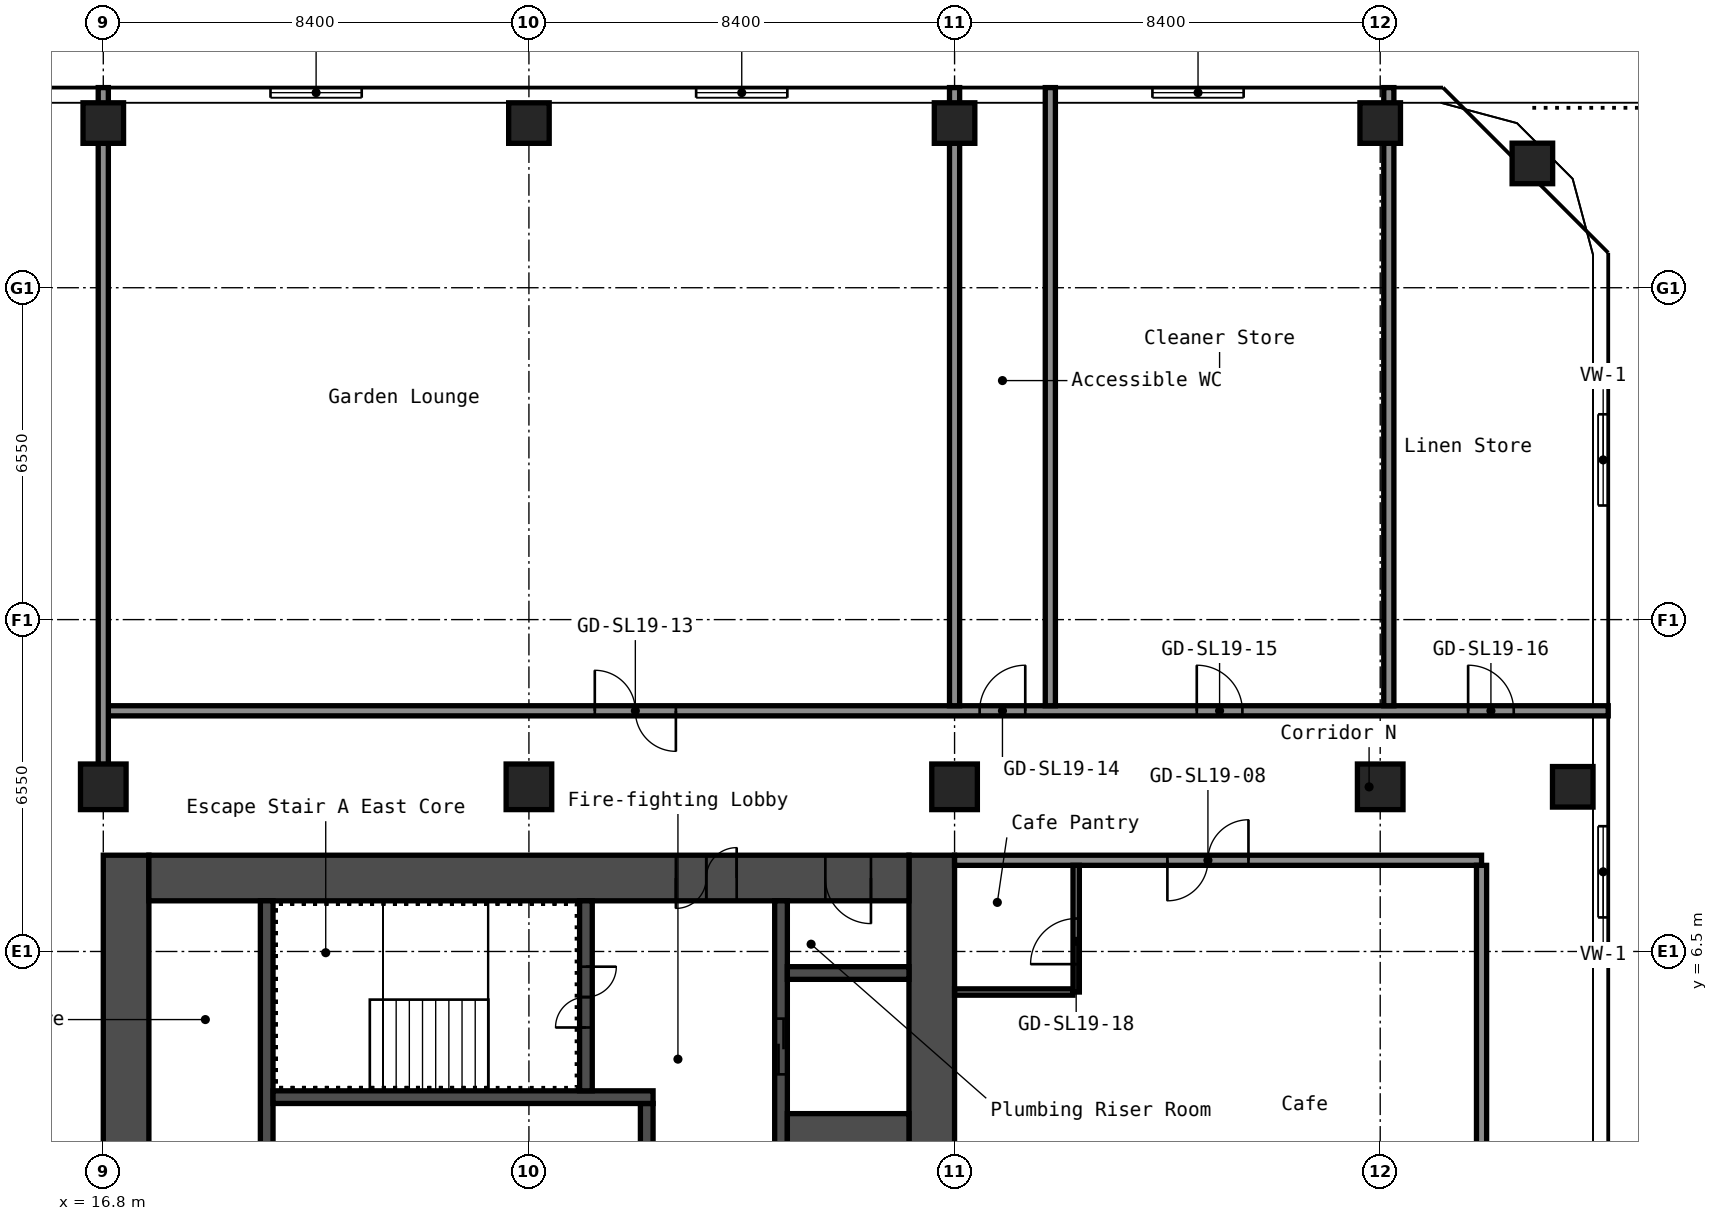
"""IFC4 building model, lengths in metres.
Left out: names, types, materials, properties, quantities, classifications, styles, units other than length and angle.
Written with IfcOpenShell. Run it as: python <this file> out.ifc"""

import sys

from ifc_helpers import new_model, si_unit, direction, frame, frame_2d, origin, origin_2d, place, context, subcontext, project, spatial, rectangle, hollow_rectangle, extrude, element, fill, save


model = new_model("IFC4")
c1 = context("Model", 3, precision=1e-05, world=origin(), true_north=direction((0.0, 1.0)))
c2 = subcontext(c1, "Body", "Model", "MODEL_VIEW")
j1 = project(units=[si_unit("LENGTHUNIT", "METRE"), si_unit("PLANEANGLEUNIT", "RADIAN")], contexts=[c1])
p1 = place(None, origin())
s1 = spatial("IfcSite", under=j1, at=p1, CompositionType="ELEMENT")
p2 = place(p1, origin())
s2 = spatial("IfcBuilding", under=s1, at=p2, CompositionType="ELEMENT")
p3 = place(p2, frame((0.0, 0.0, 69.0)))
s3 = spatial("IfcBuildingStorey", under=s2, at=p3, CompositionType="ELEMENT", Elevation=69.0)
p4 = place(p3, frame((16.8, 9.75, 0.0), z_axis=(0.0, 0.0, 1.0), x_axis=(1.0, 0.0, 0.0)))
e1 = element("IfcColumn", 1, at=p4, inside=s3, PredefinedType="COLUMN", context=c2, shape_type="SweptSolid", body=[
    extrude(hollow_rectangle(XDim=0.9, YDim=0.9, WallThickness=0.036, at=origin_2d()), origin(), (0.0, 0.0, 1.0), 6.0),
])
p5 = place(p3, frame((16.8, 22.85, 0.0), z_axis=(0.0, 0.0, 1.0), x_axis=(1.0, 0.0, 0.0)))
e2 = element("IfcColumn", 2, at=p5, inside=s3, PredefinedType="COLUMN", context=c2, shape_type="SweptSolid", body=[
    extrude(hollow_rectangle(XDim=0.8, YDim=0.8, WallThickness=0.032, at=origin_2d()), origin(), (0.0, 0.0, 1.0), 6.0),
])
p6 = place(p3, frame((25.2, 9.75, 0.0), z_axis=(0.0, 0.0, 1.0), x_axis=(1.0, 0.0, 0.0)))
e3 = element("IfcColumn", 3, at=p6, inside=s3, PredefinedType="COLUMN", context=c2, shape_type="SweptSolid", body=[
    extrude(hollow_rectangle(XDim=0.9, YDim=0.9, WallThickness=0.036, at=origin_2d()), origin(), (0.0, 0.0, 1.0), 6.0),
])
p7 = place(p3, frame((25.2, 22.85, 0.0), z_axis=(0.0, 0.0, 1.0), x_axis=(1.0, 0.0, 0.0)))
e4 = element("IfcColumn", 4, at=p7, inside=s3, PredefinedType="COLUMN", context=c2, shape_type="SweptSolid", body=[
    extrude(hollow_rectangle(XDim=0.8, YDim=0.8, WallThickness=0.032, at=origin_2d()), origin(), (0.0, 0.0, 1.0), 6.0),
])
p8 = place(p3, frame((33.6, 9.75, 0.0), z_axis=(0.0, 0.0, 1.0), x_axis=(1.0, 0.0, 0.0)))
e5 = element("IfcColumn", 5, at=p8, inside=s3, PredefinedType="COLUMN", context=c2, shape_type="SweptSolid", body=[
    extrude(hollow_rectangle(XDim=0.9, YDim=0.9, WallThickness=0.036, at=origin_2d()), origin(), (0.0, 0.0, 1.0), 6.0),
])
p9 = place(p3, frame((33.6, 22.85, 0.0), z_axis=(0.0, 0.0, 1.0), x_axis=(1.0, 0.0, 0.0)))
e6 = element("IfcColumn", 6, at=p9, inside=s3, PredefinedType="COLUMN", context=c2, shape_type="SweptSolid", body=[
    extrude(hollow_rectangle(XDim=0.8, YDim=0.8, WallThickness=0.032, at=origin_2d()), origin(), (0.0, 0.0, 1.0), 6.0),
])
p10 = place(p3, frame((42.0, 9.75, 0.0), z_axis=(0.0, 0.0, 1.0), x_axis=(1.0, 0.0, 0.0)))
e7 = element("IfcColumn", 7, at=p10, inside=s3, PredefinedType="COLUMN", context=c2, shape_type="SweptSolid", body=[
    extrude(hollow_rectangle(XDim=0.9, YDim=0.9, WallThickness=0.036, at=origin_2d()), origin(), (0.0, 0.0, 1.0), 6.0),
])
for number, where, z_axis, x_axis in (
    (8, (42.0, 22.85, 0.0), (0.0, 0.0, 1.0), (1.0, 0.0, 0.0)),
    (9, (45.8, 9.75, 0.0), (0.0, 0.0, 1.0), (1.0, 0.0, 0.0)),
    (10, (45.003, 22.053, 0.0), (0.0, 0.0, 1.0), (1.0, 0.0, 0.0)),
):
    element("IfcColumn", number, at=place(p3, frame(where, z_axis=z_axis, x_axis=x_axis)), inside=s3, PredefinedType="COLUMN", context=c2, shape_type="SweptSolid", body=[
        extrude(hollow_rectangle(XDim=0.8, YDim=0.8, WallThickness=0.032, at=origin_2d()), origin(), (0.0, 0.0, 1.0), 6.0),
    ])
p11 = place(p3, frame((17.25, -8.4, 0.0), z_axis=(0.0, 0.0, 1.0), x_axis=(0.0, 1.0, 0.0)))
e11 = element("IfcWall", 11, at=p11, inside=s3, PredefinedType="SHEAR", context=c2, shape_type="SweptSolid", body=[
    extrude(rectangle(XDim=16.8, YDim=0.9, at=frame_2d((8.4, 0.0))), origin(), (0.0, 0.0, 1.0), 6.0),
])
p12 = place(p11, frame((7.6, 0.0, 0.0)))
e12 = element("IfcOpeningElement", 12, at=p12, cuts=e11, PredefinedType="OPENING", context=c2, shape_type="SweptSolid", body=[
    extrude(rectangle(XDim=1.2, YDim=2.1, at=frame_2d((0.6, 1.05))), frame((0.0, 0.46, 0.0), z_axis=(0.0, -1.0, 0.0), x_axis=(1.0, 0.0, 0.0)), (0.0, 0.0, 1.0), 0.92),
])
p13 = place(p3, frame((33.15, -8.4, 0.0), z_axis=(0.0, 0.0, 1.0), x_axis=(0.0, 1.0, 0.0)))
e13 = element("IfcWall", 13, at=p13, inside=s3, PredefinedType="SHEAR", context=c2, shape_type="SweptSolid", body=[
    extrude(rectangle(XDim=16.8, YDim=0.9, at=frame_2d((8.4, 0.0))), origin(), (0.0, 0.0, 1.0), 6.0),
])
p14 = place(p3, frame((17.7, 7.95, 0.0), z_axis=(0.0, 0.0, 1.0), x_axis=(1.0, 0.0, 0.0)))
e14 = element("IfcWall", 14, at=p14, inside=s3, PredefinedType="SHEAR", context=c2, shape_type="SweptSolid", body=[
    extrude(rectangle(XDim=15.0, YDim=0.9, at=frame_2d((7.5, 0.0))), origin(), (0.0, 0.0, 1.0), 6.0),
])
p15 = place(p14, frame((10.4, 0.0, 0.0)))
e15 = element("IfcOpeningElement", 15, at=p15, cuts=e14, PredefinedType="OPENING", context=c2, shape_type="SweptSolid", body=[
    extrude(rectangle(XDim=1.2, YDim=2.1, at=frame_2d((0.6, 1.05))), frame((0.0, 0.46, 0.0), z_axis=(0.0, -1.0, 0.0), x_axis=(1.0, 0.0, 0.0)), (0.0, 0.0, 1.0), 0.92),
])
p16 = place(p14, frame((13.35, 0.0, 0.0)))
e16 = element("IfcOpeningElement", 16, at=p16, cuts=e14, PredefinedType="OPENING", context=c2, shape_type="SweptSolid", body=[
    extrude(rectangle(XDim=0.9, YDim=2.1, at=frame_2d((0.45, 1.05))), frame((0.0, 0.46, 0.0), z_axis=(0.0, -1.0, 0.0), x_axis=(1.0, 0.0, 0.0)), (0.0, 0.0, 1.0), 0.92),
])
p17 = place(p3, frame((20.025, 1.2, 0.0), z_axis=(0.0, 0.0, 1.0), x_axis=(0.0, 1.0, 0.0)))
e17 = element("IfcWall", 17, at=p17, inside=s3, PredefinedType="SHEAR", context=c2, shape_type="SweptSolid", body=[
    extrude(rectangle(XDim=6.3, YDim=0.25, at=frame_2d((3.15, 0.0))), origin(), (0.0, 0.0, 1.0), 6.0),
])
p18 = place(p3, frame((27.525, 1.45, 0.0), z_axis=(0.0, 0.0, 1.0), x_axis=(0.0, 1.0, 0.0)))
e18 = element("IfcWall", 18, at=p18, inside=s3, PredefinedType="SHEAR", context=c2, shape_type="SweptSolid", body=[
    extrude(rectangle(XDim=2.05, YDim=0.25, at=frame_2d((1.025, 0.0))), origin(), (0.0, 0.0, 1.0), 6.0),
])
p19 = place(p3, frame((20.15, 3.625, 0.0), z_axis=(0.0, 0.0, 1.0), x_axis=(1.0, 0.0, 0.0)))
e19 = element("IfcWall", 19, at=p19, inside=s3, PredefinedType="SHEAR", context=c2, shape_type="SweptSolid", body=[
    extrude(rectangle(XDim=7.5, YDim=0.25, at=frame_2d((3.75, 0.0))), origin(), (0.0, 0.0, 1.0), 6.0),
])
p20 = place(p3, frame((26.325, 3.75, 0.0), z_axis=(0.0, 0.0, 1.0), x_axis=(0.0, 1.0, 0.0)))
e20 = element("IfcWall", 20, at=p20, inside=s3, PredefinedType="SHEAR", context=c2, shape_type="SweptSolid", body=[
    extrude(rectangle(XDim=3.75, YDim=0.25, at=frame_2d((1.875, 0.0))), origin(), (0.0, 0.0, 1.0), 6.0),
])
p21 = place(p20, frame((1.25, 0.0, 0.0)))
e21 = element("IfcOpeningElement", 21, at=p21, cuts=e20, PredefinedType="OPENING", context=c2, shape_type="SweptSolid", body=[
    extrude(rectangle(XDim=1.2, YDim=2.1, at=frame_2d((0.6, 1.05))), frame((0.0, 0.135, 0.0), z_axis=(0.0, -1.0, 0.0), x_axis=(1.0, 0.0, 0.0)), (0.0, 0.0, 1.0), 0.27),
])
p22 = place(p3, frame((30.175, 1.45, 0.0), z_axis=(0.0, 0.0, 1.0), x_axis=(0.0, 1.0, 0.0)))
e22 = element("IfcWall", 22, at=p22, inside=s3, PredefinedType="SHEAR", context=c2, shape_type="SweptSolid", body=[
    extrude(rectangle(XDim=6.05, YDim=0.25, at=frame_2d((3.025, 0.0))), origin(), (0.0, 0.0, 1.0), 6.0),
])
p23 = place(p22, frame((2.625, 0.0, 0.0)))
e23 = element("IfcOpeningElement", 23, at=p23, cuts=e22, PredefinedType="OPENING", context=c2, shape_type="SweptSolid", body=[
    extrude(rectangle(XDim=1.1, YDim=2.1, at=frame_2d((0.55, 1.05))), frame((0.0, 0.135, 0.0), z_axis=(0.0, -1.0, 0.0), x_axis=(1.0, 0.0, 0.0)), (0.0, 0.0, 1.0), 0.27),
])
p24 = place(p3, frame((30.3, 2.375, 0.0), z_axis=(0.0, 0.0, 1.0), x_axis=(1.0, 0.0, 0.0)))
e24 = element("IfcWall", 24, at=p24, inside=s3, PredefinedType="SHEAR", context=c2, shape_type="SweptSolid", body=[
    extrude(rectangle(XDim=2.4, YDim=1.85, at=frame_2d((1.2, 0.0))), origin(), (0.0, 0.0, 1.0), 6.0),
])
p25 = place(p3, frame((30.3, 6.075, 0.0), z_axis=(0.0, 0.0, 1.0), x_axis=(1.0, 0.0, 0.0)))
e25 = element("IfcWall", 25, at=p25, inside=s3, PredefinedType="SHEAR", context=c2, shape_type="SweptSolid", body=[
    extrude(rectangle(XDim=2.4, YDim=0.25, at=frame_2d((1.2, 0.0))), origin(), (0.0, 0.0, 1.0), 6.0),
])
p26 = place(p3, frame((33.6, 5.7, 0.0), z_axis=(0.0, 0.0, 1.0), x_axis=(1.0, 0.0, 0.0)))
e26 = element("IfcWall", 26, at=p26, inside=s3, PredefinedType="PARTITIONING", context=c2, shape_type="SweptSolid", body=[
    extrude(rectangle(XDim=2.337, YDim=0.125, at=frame_2d((1.169, 0.0))), origin(), (0.0, 0.0, 1.0), 6.0),
])
p27 = place(p3, frame((33.6, 8.3, 0.0), z_axis=(0.0, 0.0, 1.0), x_axis=(1.0, 0.0, 0.0)))
e27 = element("IfcWall", 27, at=p27, inside=s3, PredefinedType="PARTITIONING", context=c2, shape_type="SweptSolid", body=[
    extrude(rectangle(XDim=10.4, YDim=0.2, at=frame_2d((5.2, 0.0))), origin(), (0.0, 0.0, 1.0), 6.0),
])
p28 = place(p27, frame((4.2, 0.0, 0.0)))
e28 = element("IfcOpeningElement", 28, at=p28, cuts=e27, PredefinedType="OPENING", context=c2, shape_type="SweptSolid", body=[
    extrude(rectangle(XDim=1.6, YDim=2.1, at=frame_2d((0.8, 1.05))), frame((0.0, 0.11, 0.0), z_axis=(0.0, -1.0, 0.0), x_axis=(1.0, 0.0, 0.0)), (0.0, 0.0, 1.0), 0.22),
])
p29 = place(p3, frame((16.8, 11.25, 0.0), z_axis=(0.0, 0.0, 1.0), x_axis=(1.0, 0.0, 0.0)))
e29 = element("IfcWall", 29, at=p29, inside=s3, PredefinedType="PARTITIONING", context=c2, shape_type="SweptSolid", body=[
    extrude(rectangle(XDim=29.7, YDim=0.2, at=frame_2d((14.85, 0.0))), origin(), (0.0, 0.0, 1.0), 6.0),
])
p30 = place(p29, frame((9.7, 0.0, 0.0)))
e30 = element("IfcOpeningElement", 30, at=p30, cuts=e29, PredefinedType="OPENING", context=c2, shape_type="SweptSolid", body=[
    extrude(rectangle(XDim=1.6, YDim=2.1, at=frame_2d((0.8, 1.05))), frame((0.0, 0.11, 0.0), z_axis=(0.0, -1.0, 0.0), x_axis=(1.0, 0.0, 0.0)), (0.0, 0.0, 1.0), 0.22),
])
p31 = place(p29, frame((17.295, 0.0, 0.0)))
e31 = element("IfcOpeningElement", 31, at=p31, cuts=e29, PredefinedType="OPENING", context=c2, shape_type="SweptSolid", body=[
    extrude(rectangle(XDim=0.9, YDim=2.1, at=frame_2d((0.45, 1.05))), frame((0.0, 0.11, 0.0), z_axis=(0.0, -1.0, 0.0), x_axis=(1.0, 0.0, 0.0)), (0.0, 0.0, 1.0), 0.22),
])
p32 = place(p29, frame((21.58, 0.0, 0.0)))
e32 = element("IfcOpeningElement", 32, at=p32, cuts=e29, PredefinedType="OPENING", context=c2, shape_type="SweptSolid", body=[
    extrude(rectangle(XDim=0.9, YDim=2.1, at=frame_2d((0.45, 1.05))), frame((0.0, 0.11, 0.0), z_axis=(0.0, -1.0, 0.0), x_axis=(1.0, 0.0, 0.0)), (0.0, 0.0, 1.0), 0.22),
])
p33 = place(p29, frame((26.935, 0.0, 0.0)))
e33 = element("IfcOpeningElement", 33, at=p33, cuts=e29, PredefinedType="OPENING", context=c2, shape_type="SweptSolid", body=[
    extrude(rectangle(XDim=0.9, YDim=2.1, at=frame_2d((0.45, 1.05))), frame((0.0, 0.11, 0.0), z_axis=(0.0, -1.0, 0.0), x_axis=(1.0, 0.0, 0.0)), (0.0, 0.0, 1.0), 0.22),
])
p34 = place(p3, frame((16.8, 10.19, 0.0), z_axis=(0.0, 0.0, 1.0), x_axis=(0.0, 1.0, 0.0)))
e34 = element("IfcWall", 34, at=p34, inside=s3, PredefinedType="PARTITIONING", context=c2, shape_type="SweptSolid", body=[
    extrude(rectangle(XDim=13.36, YDim=0.2, at=frame_2d((6.68, 0.0))), origin(), (0.0, 0.0, 1.0), 6.0),
])
for number, where, z_axis, x_axis in (
    (35, (33.6, 11.35, 0.0), (0.0, 0.0, 1.0), (0.0, 1.0, 0.0)),
    (36, (35.49, 11.35, 0.0), (0.0, 0.0, 1.0), (0.0, 1.0, 0.0)),
):
    element("IfcWall", number, at=place(p3, frame(where, z_axis=z_axis, x_axis=x_axis)), inside=s3, PredefinedType="PARTITIONING", context=c2, shape_type="SweptSolid", body=[
        extrude(rectangle(XDim=12.2, YDim=0.2, at=frame_2d((6.1, 0.0))), origin(), (0.0, 0.0, 1.0), 6.0),
    ])
p35 = place(p3, frame((36.0, 5.7, 0.0), z_axis=(0.0, 0.0, 1.0), x_axis=(0.0, 1.0, 0.0)))
e37 = element("IfcWall", 37, at=p35, inside=s3, PredefinedType="PARTITIONING", context=c2, shape_type="SweptSolid", body=[
    extrude(rectangle(XDim=2.5, YDim=0.125, at=frame_2d((1.25, 0.0))), origin(), (0.0, 0.0, 1.0), 6.0),
])
p36 = place(p35, frame((0.55, 0.0, 0.0)))
e38 = element("IfcOpeningElement", 38, at=p36, cuts=e37, PredefinedType="OPENING", context=c2, shape_type="SweptSolid", body=[
    extrude(rectangle(XDim=0.9, YDim=2.1, at=frame_2d((0.45, 1.05))), frame((0.0, 0.073, 0.0), z_axis=(0.0, -1.0, 0.0), x_axis=(1.0, 0.0, 0.0)), (0.0, 0.0, 1.0), 0.145),
])
p37 = place(p3, frame((42.17, 11.35, 0.0), z_axis=(0.0, 0.0, 1.0), x_axis=(0.0, 1.0, 0.0)))
e39 = element("IfcWall", 39, at=p37, inside=s3, PredefinedType="PARTITIONING", context=c2, shape_type="SweptSolid", body=[
    extrude(rectangle(XDim=12.2, YDim=0.2, at=frame_2d((6.1, 0.0))), origin(), (0.0, 0.0, 1.0), 6.0),
])
p38 = place(p3, frame((44.0, -8.2, 0.0), z_axis=(0.0, 0.0, 1.0), x_axis=(0.0, 1.0, 0.0)))
e40 = element("IfcWall", 40, at=p38, inside=s3, PredefinedType="PARTITIONING", context=c2, shape_type="SweptSolid", body=[
    extrude(rectangle(XDim=16.4, YDim=0.2, at=frame_2d((8.2, 0.0))), origin(), (0.0, 0.0, 1.0), 6.0),
])
p39 = place(p3, frame((46.4, 4.0, 4.45), z_axis=(0.0, 0.0, 1.0), x_axis=(0.0, 1.0, 0.0)))
p40 = place(p39, frame((3.172, 0.0, 0.25)))
p41 = place(p40, origin())
e41 = element("IfcWindow", 41, at=p41, inside=s3, PartitioningType="SINGLE_PANEL", PredefinedType="WINDOW", context=c2, shape_type="SweptSolid", body=[
    extrude(rectangle(XDim=1.8, YDim=0.9, at=frame_2d((0.9, 0.45))), frame((0.0, 0.03, 0.0), z_axis=(0.0, -1.0, 0.0), x_axis=(1.0, 0.0, 0.0)), (0.0, 0.0, 1.0), 0.06),
])
p42 = place(p3, frame((46.4, 12.145, 4.45), z_axis=(0.0, 0.0, 1.0), x_axis=(0.0, 1.0, 0.0)))
p43 = place(p42, frame((3.157, 0.0, 0.25)))
p44 = place(p43, origin())
e42 = element("IfcWindow", 42, at=p44, inside=s3, PartitioningType="SINGLE_PANEL", PredefinedType="WINDOW", context=c2, shape_type="SweptSolid", body=[
    extrude(rectangle(XDim=1.8, YDim=0.9, at=frame_2d((0.9, 0.45))), frame((0.0, 0.03, 0.0), z_axis=(0.0, -1.0, 0.0), x_axis=(1.0, 0.0, 0.0)), (0.0, 0.0, 1.0), 0.06),
])
p45 = place(p3, frame((43.209, 23.45, 4.45), z_axis=(0.0, 0.0, 1.0), x_axis=(-1.0, 0.0, 0.0)))
p46 = place(p45, frame((3.905, 0.0, 0.25)))
p47 = place(p46, origin())
e43 = element("IfcWindow", 43, at=p47, inside=s3, PartitioningType="SINGLE_PANEL", PredefinedType="WINDOW", context=c2, shape_type="SweptSolid", body=[
    extrude(rectangle(XDim=1.8, YDim=0.9, at=frame_2d((0.9, 0.45))), frame((0.0, 0.03, 0.0), z_axis=(0.0, -1.0, 0.0), x_axis=(1.0, 0.0, 0.0)), (0.0, 0.0, 1.0), 0.06),
])
p48 = place(p3, frame((33.6, 23.45, 4.45), z_axis=(0.0, 0.0, 1.0), x_axis=(-1.0, 0.0, 0.0)))
p49 = place(p48, frame((3.3, 0.0, 0.25)))
p50 = place(p49, origin())
e44 = element("IfcWindow", 44, at=p50, inside=s3, PartitioningType="SINGLE_PANEL", PredefinedType="WINDOW", context=c2, shape_type="SweptSolid", body=[
    extrude(rectangle(XDim=1.8, YDim=0.9, at=frame_2d((0.9, 0.45))), frame((0.0, 0.03, 0.0), z_axis=(0.0, -1.0, 0.0), x_axis=(1.0, 0.0, 0.0)), (0.0, 0.0, 1.0), 0.06),
])
p51 = place(p3, frame((25.2, 23.45, 4.45), z_axis=(0.0, 0.0, 1.0), x_axis=(-1.0, 0.0, 0.0)))
p52 = place(p51, frame((3.3, 0.0, 0.25)))
p53 = place(p52, origin())
e45 = element("IfcWindow", 45, at=p53, inside=s3, PartitioningType="SINGLE_PANEL", PredefinedType="WINDOW", context=c2, shape_type="SweptSolid", body=[
    extrude(rectangle(XDim=1.8, YDim=0.9, at=frame_2d((0.9, 0.45))), frame((0.0, 0.03, 0.0), z_axis=(0.0, -1.0, 0.0), x_axis=(1.0, 0.0, 0.0)), (0.0, 0.0, 1.0), 0.06),
])
p54 = place(p15, origin())
e46 = element("IfcDoor", 46, at=p54, inside=s3, OperationType="DOUBLE_DOOR_SINGLE_SWING", PredefinedType="DOOR", context=c2, shape_type="SweptSolid", body=[
    extrude(rectangle(XDim=1.2, YDim=2.1, at=frame_2d((0.6, 1.05))), frame((0.0, 0.025, 0.0), z_axis=(0.0, -1.0, 0.0), x_axis=(1.0, 0.0, 0.0)), (0.0, 0.0, 1.0), 0.05),
])
fill(e15, e46)
p55 = place(p16, origin())
e47 = element("IfcDoor", 47, at=p55, inside=s3, OperationType="SINGLE_SWING_RIGHT", PredefinedType="DOOR", context=c2, shape_type="SweptSolid", body=[
    extrude(rectangle(XDim=0.9, YDim=2.1, at=frame_2d((0.45, 1.05))), frame((0.0, 0.025, 0.0), z_axis=(0.0, -1.0, 0.0), x_axis=(1.0, 0.0, 0.0)), (0.0, 0.0, 1.0), 0.05),
])
fill(e16, e47)
p56 = place(p21, origin())
e48 = element("IfcDoor", 48, at=p56, inside=s3, OperationType="DOUBLE_DOOR_SINGLE_SWING", PredefinedType="DOOR", context=c2, shape_type="SweptSolid", body=[
    extrude(rectangle(XDim=1.2, YDim=2.1, at=frame_2d((0.6, 1.05))), frame((0.0, 0.025, 0.0), z_axis=(0.0, -1.0, 0.0), x_axis=(1.0, 0.0, 0.0)), (0.0, 0.0, 1.0), 0.05),
])
fill(e21, e48)
p57 = place(p23, origin())
e49 = element("IfcDoor", 49, at=p57, inside=s3, OperationType="DOUBLE_DOOR_SLIDING", PredefinedType="DOOR", context=c2, shape_type="SweptSolid", body=[
    extrude(rectangle(XDim=1.1, YDim=2.1, at=frame_2d((0.55, 1.05))), frame((0.0, 0.025, 0.0), z_axis=(0.0, -1.0, 0.0), x_axis=(1.0, 0.0, 0.0)), (0.0, 0.0, 1.0), 0.05),
])
fill(e23, e49)
p58 = place(p28, origin())
e50 = element("IfcDoor", 50, at=p58, inside=s3, OperationType="DOUBLE_DOOR_SINGLE_SWING", PredefinedType="DOOR", context=c2, shape_type="SweptSolid", body=[
    extrude(rectangle(XDim=1.6, YDim=2.1, at=frame_2d((0.8, 1.05))), frame((0.0, 0.025, 0.0), z_axis=(0.0, -1.0, 0.0), x_axis=(1.0, 0.0, 0.0)), (0.0, 0.0, 1.0), 0.05),
])
fill(e28, e50)
p59 = place(p30, origin())
e51 = element("IfcDoor", 51, at=p59, inside=s3, OperationType="DOUBLE_DOOR_SINGLE_SWING", PredefinedType="DOOR", context=c2, shape_type="SweptSolid", body=[
    extrude(rectangle(XDim=1.6, YDim=2.1, at=frame_2d((0.8, 1.05))), frame((0.0, 0.025, 0.0), z_axis=(0.0, -1.0, 0.0), x_axis=(1.0, 0.0, 0.0)), (0.0, 0.0, 1.0), 0.05),
])
fill(e30, e51)
p60 = place(p31, origin())
e52 = element("IfcDoor", 52, at=p60, inside=s3, OperationType="SINGLE_SWING_LEFT", PredefinedType="DOOR", context=c2, shape_type="SweptSolid", body=[
    extrude(rectangle(XDim=0.9, YDim=2.1, at=frame_2d((0.45, 1.05))), frame((0.0, 0.025, 0.0), z_axis=(0.0, -1.0, 0.0), x_axis=(1.0, 0.0, 0.0)), (0.0, 0.0, 1.0), 0.05),
])
fill(e31, e52)
p61 = place(p32, origin())
e53 = element("IfcDoor", 53, at=p61, inside=s3, OperationType="SINGLE_SWING_RIGHT", PredefinedType="DOOR", context=c2, shape_type="SweptSolid", body=[
    extrude(rectangle(XDim=0.9, YDim=2.1, at=frame_2d((0.45, 1.05))), frame((0.0, 0.025, 0.0), z_axis=(0.0, -1.0, 0.0), x_axis=(1.0, 0.0, 0.0)), (0.0, 0.0, 1.0), 0.05),
])
fill(e32, e53)
p62 = place(p33, origin())
e54 = element("IfcDoor", 54, at=p62, inside=s3, OperationType="SINGLE_SWING_RIGHT", PredefinedType="DOOR", context=c2, shape_type="SweptSolid", body=[
    extrude(rectangle(XDim=0.9, YDim=2.1, at=frame_2d((0.45, 1.05))), frame((0.0, 0.025, 0.0), z_axis=(0.0, -1.0, 0.0), x_axis=(1.0, 0.0, 0.0)), (0.0, 0.0, 1.0), 0.05),
])
fill(e33, e54)
p63 = place(p36, origin())
e55 = element("IfcDoor", 55, at=p63, inside=s3, OperationType="SINGLE_SWING_RIGHT", PredefinedType="DOOR", context=c2, shape_type="SweptSolid", body=[
    extrude(rectangle(XDim=0.9, YDim=2.1, at=frame_2d((0.45, 1.05))), frame((0.0, 0.025, 0.0), z_axis=(0.0, -1.0, 0.0), x_axis=(1.0, 0.0, 0.0)), (0.0, 0.0, 1.0), 0.05),
])
fill(e38, e55)
save(model, sys.argv[1])
